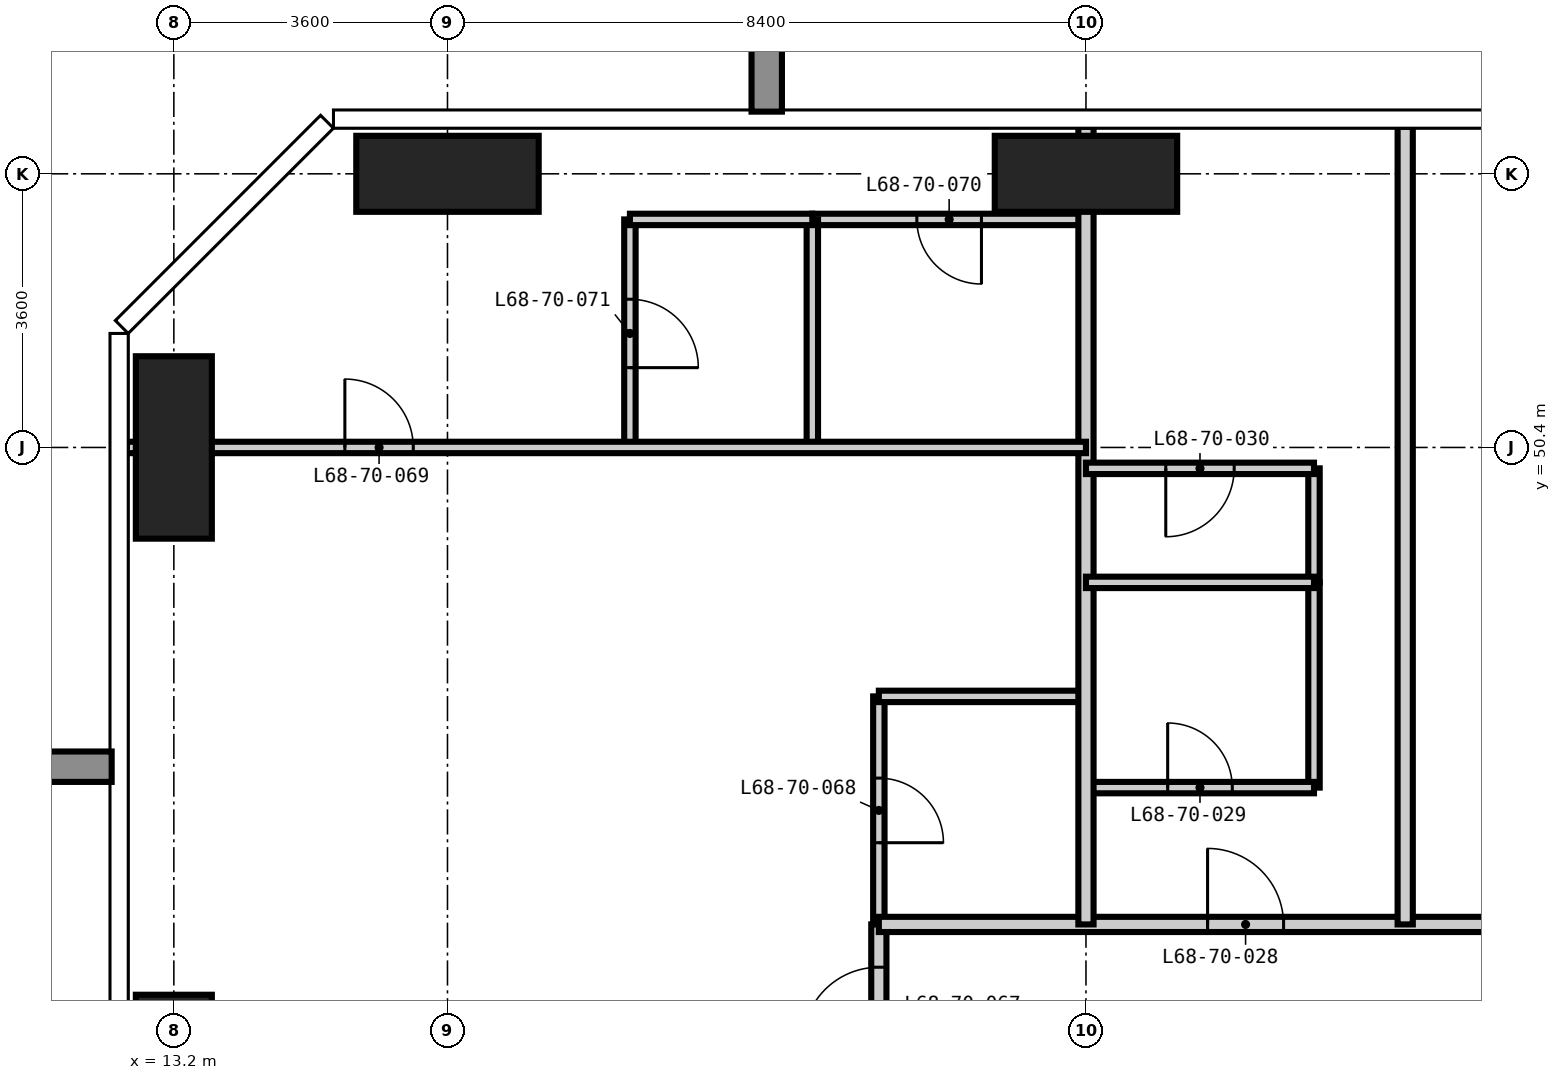
"""IFC4 building model, lengths in metres.
Left out: names, types, materials, properties, quantities, classifications, styles, units other than length and angle.
Written with IfcOpenShell. Run it as: python <this file> out.ifc"""

import sys

from ifc_helpers import new_model, si_unit, direction, frame, frame_2d, origin, origin_2d, place, context, subcontext, project, spatial, rectangle, extrude, element, fill, save


model = new_model("IFC4")
c1 = context("Model", 3, precision=1e-05, world=origin(), true_north=direction((0.0, 1.0)))
c2 = subcontext(c1, "Body", "Model", "MODEL_VIEW")
j1 = project(units=[si_unit("LENGTHUNIT", "METRE"), si_unit("PLANEANGLEUNIT", "RADIAN")], contexts=[c1])
p1 = place(None, origin())
s1 = spatial("IfcSite", under=j1, at=p1, CompositionType="ELEMENT")
p2 = place(p1, origin())
s2 = spatial("IfcBuilding", under=s1, at=p2, CompositionType="ELEMENT")
p3 = place(p2, frame((0.0, 0.0, 264.6)))
s3 = spatial("IfcBuildingStorey", under=s2, at=p3, CompositionType="ELEMENT", Elevation=264.6)
for number, where, z_axis, x_axis in (
    (1, (13.2, 42.0, -0.35), (0.0, 0.0, 1.0), (1.0, 0.0, 0.0)),
    (2, (13.2, 50.4, -0.35), (0.0, 0.0, 1.0), (1.0, 0.0, 0.0)),
):
    element("IfcColumn", number, at=place(p3, frame(where, z_axis=z_axis, x_axis=x_axis)), inside=s3, PredefinedType="COLUMN", context=c2, shape_type="SweptSolid", body=[
        extrude(rectangle(XDim=1.0, YDim=2.4, at=origin_2d()), origin(), (0.0, 0.0, 1.0), 3.9),
    ])
for number, where, z_axis, x_axis in (
    (3, (16.8, 54.0, -0.35), (0.0, 0.0, 1.0), (1.0, 0.0, 0.0)),
    (4, (25.2, 54.0, -0.35), (0.0, 0.0, 1.0), (1.0, 0.0, 0.0)),
):
    element("IfcColumn", number, at=place(p3, frame(where, z_axis=z_axis, x_axis=x_axis)), inside=s3, PredefinedType="COLUMN", context=c2, shape_type="SweptSolid", body=[
        extrude(rectangle(XDim=2.4, YDim=1.0, at=origin_2d()), origin(), (0.0, 0.0, 1.0), 3.9),
    ])
p4 = place(p3, frame((22.475, 44.125, 0.0), z_axis=(0.0, 0.0, 1.0), x_axis=(0.0, 1.0, 0.0)))
e5 = element("IfcWall", 5, at=p4, inside=s3, PredefinedType="PARTITIONING", context=c2, shape_type="SweptSolid", body=[
    extrude(rectangle(XDim=3.0, YDim=0.15, at=frame_2d((1.5, 0.0))), origin(), (0.0, 0.0, 1.0), 3.55),
])
p5 = place(p4, frame((1.075, 0.0, 0.0)))
e6 = element("IfcOpeningElement", 6, at=p5, cuts=e5, PredefinedType="OPENING", context=c2, shape_type="SweptSolid", body=[
    extrude(rectangle(XDim=0.85, YDim=2.1, at=frame_2d((0.425, 1.05))), frame((0.0, 0.085, 0.0), z_axis=(0.0, -1.0, 0.0), x_axis=(1.0, 0.0, 0.0)), (0.0, 0.0, 1.0), 0.17),
])
p6 = place(p3, frame((28.2, 45.925, 0.0), z_axis=(0.0, 0.0, 1.0), x_axis=(0.0, 1.0, 0.0)))
e7 = element("IfcWall", 7, at=p6, inside=s3, PredefinedType="PARTITIONING", context=c2, shape_type="SweptSolid", body=[
    extrude(rectangle(XDim=2.7, YDim=0.15, at=frame_2d((1.35, 0.0))), origin(), (0.0, 0.0, 1.0), 3.55),
])
p7 = place(p3, frame((25.2, 45.925, 0.0), z_axis=(0.0, 0.0, 1.0), x_axis=(1.0, 0.0, 0.0)))
e8 = element("IfcWall", 8, at=p7, inside=s3, PredefinedType="PARTITIONING", context=c2, shape_type="SweptSolid", body=[
    extrude(rectangle(XDim=3.0, YDim=0.15, at=frame_2d((1.5, 0.0))), origin(), (0.0, 0.0, 1.0), 3.55),
])
p8 = place(p7, frame((1.075, 0.0, 0.0)))
e9 = element("IfcOpeningElement", 9, at=p8, cuts=e8, PredefinedType="OPENING", context=c2, shape_type="SweptSolid", body=[
    extrude(rectangle(XDim=0.85, YDim=2.1, at=frame_2d((0.425, 1.05))), frame((0.0, 0.085, 0.0), z_axis=(0.0, -1.0, 0.0), x_axis=(1.0, 0.0, 0.0)), (0.0, 0.0, 1.0), 0.17),
])
p9 = place(p3, frame((22.475, 47.125, 0.0), z_axis=(0.0, 0.0, 1.0), x_axis=(1.0, 0.0, 0.0)))
e10 = element("IfcWall", 10, at=p9, inside=s3, PredefinedType="PARTITIONING", context=c2, shape_type="SweptSolid", body=[
    extrude(rectangle(XDim=2.725, YDim=0.15, at=frame_2d((1.362, 0.0))), origin(), (0.0, 0.0, 1.0), 3.55),
])
p10 = place(p3, frame((21.6, 53.4, 0.0), z_axis=(0.0, 0.0, 1.0), x_axis=(1.0, 0.0, 0.0)))
e11 = element("IfcWall", 11, at=p10, inside=s3, PredefinedType="PARTITIONING", context=c2, shape_type="SweptSolid", body=[
    extrude(rectangle(XDim=3.6, YDim=0.15, at=frame_2d((1.8, 0.0))), origin(), (0.0, 0.0, 1.0), 3.55),
])
p11 = place(p10, frame((1.375, 0.0, 0.0)))
e12 = element("IfcOpeningElement", 12, at=p11, cuts=e11, PredefinedType="OPENING", context=c2, shape_type="SweptSolid", body=[
    extrude(rectangle(XDim=0.85, YDim=2.1, at=frame_2d((0.425, 1.05))), frame((0.0, 0.085, 0.0), z_axis=(0.0, -1.0, 0.0), x_axis=(1.0, 0.0, 0.0)), (0.0, 0.0, 1.0), 0.17),
])
p12 = place(p3, frame((22.475, 14.075, 0.0), z_axis=(0.0, 0.0, 1.0), x_axis=(0.0, 1.0, 0.0)))
e13 = element("IfcWall", 13, at=p12, inside=s3, PredefinedType="PARTITIONING", context=c2, shape_type="SweptSolid", body=[
    extrude(rectangle(XDim=30.05, YDim=0.2, at=frame_2d((15.025, 0.0))), origin(), (0.0, 0.0, 1.0), 3.55),
])
p13 = place(p12, frame((4.325, 0.0, 0.0)))
e14 = element("IfcOpeningElement", 14, at=p13, cuts=e13, PredefinedType="OPENING", context=c2, shape_type="SweptSolid", body=[
    extrude(rectangle(XDim=1.0, YDim=2.2, at=frame_2d((0.5, 1.1))), frame((0.0, 0.11, 0.0), z_axis=(0.0, -1.0, 0.0), x_axis=(1.0, 0.0, 0.0)), (0.0, 0.0, 1.0), 0.22),
])
p14 = place(p12, frame((8.525, 0.0, 0.0)))
e15 = element("IfcOpeningElement", 15, at=p14, cuts=e13, PredefinedType="OPENING", context=c2, shape_type="SweptSolid", body=[
    extrude(rectangle(XDim=1.0, YDim=2.2, at=frame_2d((0.5, 1.1))), frame((0.0, 0.11, 0.0), z_axis=(0.0, -1.0, 0.0), x_axis=(1.0, 0.0, 0.0)), (0.0, 0.0, 1.0), 0.22),
])
p15 = place(p12, frame((13.625, 0.0, 0.0)))
e16 = element("IfcOpeningElement", 16, at=p15, cuts=e13, PredefinedType="OPENING", context=c2, shape_type="SweptSolid", body=[
    extrude(rectangle(XDim=1.0, YDim=2.2, at=frame_2d((0.5, 1.1))), frame((0.0, 0.11, 0.0), z_axis=(0.0, -1.0, 0.0), x_axis=(1.0, 0.0, 0.0)), (0.0, 0.0, 1.0), 0.22),
])
p16 = place(p12, frame((25.325, 0.0, 0.0)))
e17 = element("IfcOpeningElement", 17, at=p16, cuts=e13, PredefinedType="OPENING", context=c2, shape_type="SweptSolid", body=[
    extrude(rectangle(XDim=1.0, YDim=2.2, at=frame_2d((0.5, 1.1))), frame((0.0, 0.11, 0.0), z_axis=(0.0, -1.0, 0.0), x_axis=(1.0, 0.0, 0.0)), (0.0, 0.0, 1.0), 0.22),
])
p17 = place(p12, frame((0.863, 0.0, 0.0)))
e18 = element("IfcOpeningElement", 18, at=p17, cuts=e13, PredefinedType="OPENING", context=c2, shape_type="SweptSolid", body=[
    extrude(rectangle(XDim=1.0, YDim=2.2, at=frame_2d((0.5, 1.1))), frame((0.0, 0.11, 0.0), z_axis=(0.0, -1.0, 0.0), x_axis=(1.0, 0.0, 0.0)), (0.0, 0.0, 1.0), 0.22),
])
p18 = place(p12, frame((28.487, 0.0, 0.0)))
e19 = element("IfcOpeningElement", 19, at=p18, cuts=e13, PredefinedType="OPENING", context=c2, shape_type="SweptSolid", body=[
    extrude(rectangle(XDim=1.0, YDim=2.2, at=frame_2d((0.5, 1.1))), frame((0.0, 0.11, 0.0), z_axis=(0.0, -1.0, 0.0), x_axis=(1.0, 0.0, 0.0)), (0.0, 0.0, 1.0), 0.22),
])
p19 = place(p3, frame((22.475, 44.125, 0.0), z_axis=(0.0, 0.0, 1.0), x_axis=(1.0, 0.0, 0.0)))
e20 = element("IfcWall", 20, at=p19, inside=s3, PredefinedType="PARTITIONING", context=c2, shape_type="SweptSolid", body=[
    extrude(rectangle(XDim=22.85, YDim=0.2, at=frame_2d((11.425, 0.0))), origin(), (0.0, 0.0, 1.0), 3.55),
])
p20 = place(p19, frame((4.325, 0.0, 0.0)))
e21 = element("IfcOpeningElement", 21, at=p20, cuts=e20, PredefinedType="OPENING", context=c2, shape_type="SweptSolid", body=[
    extrude(rectangle(XDim=1.0, YDim=2.2, at=frame_2d((0.5, 1.1))), frame((0.0, 0.11, 0.0), z_axis=(0.0, -1.0, 0.0), x_axis=(1.0, 0.0, 0.0)), (0.0, 0.0, 1.0), 0.22),
])
p21 = place(p19, frame((10.625, 0.0, 0.0)))
e22 = element("IfcOpeningElement", 22, at=p21, cuts=e20, PredefinedType="OPENING", context=c2, shape_type="SweptSolid", body=[
    extrude(rectangle(XDim=1.0, YDim=2.2, at=frame_2d((0.5, 1.1))), frame((0.0, 0.11, 0.0), z_axis=(0.0, -1.0, 0.0), x_axis=(1.0, 0.0, 0.0)), (0.0, 0.0, 1.0), 0.22),
])
p22 = place(p19, frame((16.925, 0.0, 0.0)))
e23 = element("IfcOpeningElement", 23, at=p22, cuts=e20, PredefinedType="OPENING", context=c2, shape_type="SweptSolid", body=[
    extrude(rectangle(XDim=1.0, YDim=2.2, at=frame_2d((0.5, 1.1))), frame((0.0, 0.11, 0.0), z_axis=(0.0, -1.0, 0.0), x_axis=(1.0, 0.0, 0.0)), (0.0, 0.0, 1.0), 0.22),
])
for number, where, z_axis, x_axis in (
    (24, (25.2, 44.125, 0.0), (0.0, 0.0, 1.0), (0.0, 1.0, 0.0)),
    (25, (29.4, 44.125, 0.0), (0.0, 0.0, 1.0), (0.0, 1.0, 0.0)),
):
    element("IfcWall", number, at=place(p3, frame(where, z_axis=z_axis, x_axis=x_axis)), inside=s3, PredefinedType="PARTITIONING", context=c2, shape_type="SweptSolid", body=[
        extrude(rectangle(XDim=10.493, YDim=0.2, at=frame_2d((5.247, 0.0))), origin(), (0.0, 0.0, 1.0), 3.55),
    ])
p23 = place(p3, frame((19.2, 50.4, 0.0), z_axis=(0.0, 0.0, 1.0), x_axis=(0.0, 1.0, 0.0)))
e26 = element("IfcWall", 26, at=p23, inside=s3, PredefinedType="PARTITIONING", context=c2, shape_type="SweptSolid", body=[
    extrude(rectangle(XDim=3.0, YDim=0.15, at=frame_2d((1.5, 0.0))), origin(), (0.0, 0.0, 1.0), 3.55),
])
p24 = place(p23, frame((1.05, 0.0, 0.0)))
e27 = element("IfcOpeningElement", 27, at=p24, cuts=e26, PredefinedType="OPENING", context=c2, shape_type="SweptSolid", body=[
    extrude(rectangle(XDim=0.9, YDim=2.1, at=frame_2d((0.45, 1.05))), frame((0.0, 0.085, 0.0), z_axis=(0.0, -1.0, 0.0), x_axis=(1.0, 0.0, 0.0)), (0.0, 0.0, 1.0), 0.17),
])
p25 = place(p3, frame((21.6, 50.4, 0.0), z_axis=(0.0, 0.0, 1.0), x_axis=(0.0, 1.0, 0.0)))
e28 = element("IfcWall", 28, at=p25, inside=s3, PredefinedType="PARTITIONING", context=c2, shape_type="SweptSolid", body=[
    extrude(rectangle(XDim=3.0, YDim=0.15, at=frame_2d((1.5, 0.0))), origin(), (0.0, 0.0, 1.0), 3.55),
])
p26 = place(p3, frame((28.2, 48.625, 0.0), z_axis=(0.0, 0.0, 1.0), x_axis=(0.0, 1.0, 0.0)))
e29 = element("IfcWall", 29, at=p26, inside=s3, PredefinedType="PARTITIONING", context=c2, shape_type="SweptSolid", body=[
    extrude(rectangle(XDim=1.5, YDim=0.15, at=frame_2d((0.75, 0.0))), origin(), (0.0, 0.0, 1.0), 3.55),
])
p27 = place(p3, frame((25.2, 48.625, 0.0), z_axis=(0.0, 0.0, 1.0), x_axis=(1.0, 0.0, 0.0)))
e30 = element("IfcWall", 30, at=p27, inside=s3, PredefinedType="PARTITIONING", context=c2, shape_type="SweptSolid", body=[
    extrude(rectangle(XDim=3.0, YDim=0.15, at=frame_2d((1.5, 0.0))), origin(), (0.0, 0.0, 1.0), 3.55),
])
p28 = place(p3, frame((25.2, 50.125, 0.0), z_axis=(0.0, 0.0, 1.0), x_axis=(1.0, 0.0, 0.0)))
e31 = element("IfcWall", 31, at=p28, inside=s3, PredefinedType="PARTITIONING", context=c2, shape_type="SweptSolid", body=[
    extrude(rectangle(XDim=3.0, YDim=0.15, at=frame_2d((1.5, 0.0))), origin(), (0.0, 0.0, 1.0), 3.55),
])
p29 = place(p28, frame((1.05, 0.0, 0.0)))
e32 = element("IfcOpeningElement", 32, at=p29, cuts=e31, PredefinedType="OPENING", context=c2, shape_type="SweptSolid", body=[
    extrude(rectangle(XDim=0.9, YDim=2.1, at=frame_2d((0.45, 1.05))), frame((0.0, 0.085, 0.0), z_axis=(0.0, -1.0, 0.0), x_axis=(1.0, 0.0, 0.0)), (0.0, 0.0, 1.0), 0.17),
])
p30 = place(p3, frame((12.582, 50.4, 0.0), z_axis=(0.0, 0.0, 1.0), x_axis=(1.0, 0.0, 0.0)))
e33 = element("IfcWall", 33, at=p30, inside=s3, PredefinedType="PARTITIONING", context=c2, shape_type="SweptSolid", body=[
    extrude(rectangle(XDim=12.618, YDim=0.15, at=frame_2d((6.309, 0.0))), origin(), (0.0, 0.0, 1.0), 3.55),
])
p31 = place(p30, frame((2.868, 0.0, 0.0)))
e34 = element("IfcOpeningElement", 34, at=p31, cuts=e33, PredefinedType="OPENING", context=c2, shape_type="SweptSolid", body=[
    extrude(rectangle(XDim=0.9, YDim=2.1, at=frame_2d((0.45, 1.05))), frame((0.0, 0.085, 0.0), z_axis=(0.0, -1.0, 0.0), x_axis=(1.0, 0.0, 0.0)), (0.0, 0.0, 1.0), 0.17),
])
p32 = place(p3, frame((19.2, 53.4, 0.0), z_axis=(0.0, 0.0, 1.0), x_axis=(1.0, 0.0, 0.0)))
e35 = element("IfcWall", 35, at=p32, inside=s3, PredefinedType="PARTITIONING", context=c2, shape_type="SweptSolid", body=[
    extrude(rectangle(XDim=2.4, YDim=0.15, at=frame_2d((1.2, 0.0))), origin(), (0.0, 0.0, 1.0), 3.55),
])
p33 = place(p20, origin())
e36 = element("IfcDoor", 36, at=p33, inside=s3, OperationType="SINGLE_SWING_LEFT", PredefinedType="DOOR", context=c2, shape_type="SweptSolid", body=[
    extrude(rectangle(XDim=1.0, YDim=2.2, at=frame_2d((0.5, 1.1))), frame((0.0, 0.025, 0.0), z_axis=(0.0, -1.0, 0.0), x_axis=(1.0, 0.0, 0.0)), (0.0, 0.0, 1.0), 0.05),
])
fill(e21, e36)
p34 = place(p8, origin())
e37 = element("IfcDoor", 37, at=p34, inside=s3, OperationType="SINGLE_SWING_LEFT", PredefinedType="DOOR", context=c2, shape_type="SweptSolid", body=[
    extrude(rectangle(XDim=0.85, YDim=2.1, at=frame_2d((0.425, 1.05))), frame((0.0, 0.025, 0.0), z_axis=(0.0, -1.0, 0.0), x_axis=(1.0, 0.0, 0.0)), (0.0, 0.0, 1.0), 0.05),
])
fill(e9, e37)
p35 = place(p29, frame((0.9, 0.0, 0.0), z_axis=(0.0, 0.0, 1.0), x_axis=(-1.0, 0.0, 0.0)))
e38 = element("IfcDoor", 38, at=p35, inside=s3, OperationType="SINGLE_SWING_RIGHT", PredefinedType="DOOR", context=c2, shape_type="SweptSolid", body=[
    extrude(rectangle(XDim=0.9, YDim=2.1, at=frame_2d((0.45, 1.05))), frame((0.0, 0.025, 0.0), z_axis=(0.0, -1.0, 0.0), x_axis=(1.0, 0.0, 0.0)), (0.0, 0.0, 1.0), 0.05),
])
fill(e32, e38)
p36 = place(p18, origin())
e39 = element("IfcDoor", 39, at=p36, inside=s3, OperationType="SINGLE_SWING_LEFT", PredefinedType="DOOR", context=c2, shape_type="SweptSolid", body=[
    extrude(rectangle(XDim=1.0, YDim=2.2, at=frame_2d((0.5, 1.1))), frame((0.0, 0.025, 0.0), z_axis=(0.0, -1.0, 0.0), x_axis=(1.0, 0.0, 0.0)), (0.0, 0.0, 1.0), 0.05),
])
fill(e19, e39)
p37 = place(p5, frame((0.85, 0.0, 0.0), z_axis=(0.0, 0.0, 1.0), x_axis=(-1.0, 0.0, 0.0)))
e40 = element("IfcDoor", 40, at=p37, inside=s3, OperationType="SINGLE_SWING_RIGHT", PredefinedType="DOOR", context=c2, shape_type="SweptSolid", body=[
    extrude(rectangle(XDim=0.85, YDim=2.1, at=frame_2d((0.425, 1.05))), frame((0.0, 0.025, 0.0), z_axis=(0.0, -1.0, 0.0), x_axis=(1.0, 0.0, 0.0)), (0.0, 0.0, 1.0), 0.05),
])
fill(e6, e40)
p38 = place(p31, origin())
e41 = element("IfcDoor", 41, at=p38, inside=s3, OperationType="SINGLE_SWING_LEFT", PredefinedType="DOOR", context=c2, shape_type="SweptSolid", body=[
    extrude(rectangle(XDim=0.9, YDim=2.1, at=frame_2d((0.45, 1.05))), frame((0.0, 0.025, 0.0), z_axis=(0.0, -1.0, 0.0), x_axis=(1.0, 0.0, 0.0)), (0.0, 0.0, 1.0), 0.05),
])
fill(e34, e41)
p39 = place(p11, frame((0.85, 0.0, 0.0), z_axis=(0.0, 0.0, 1.0), x_axis=(-1.0, 0.0, 0.0)))
e42 = element("IfcDoor", 42, at=p39, inside=s3, OperationType="SINGLE_SWING_LEFT", PredefinedType="DOOR", context=c2, shape_type="SweptSolid", body=[
    extrude(rectangle(XDim=0.85, YDim=2.1, at=frame_2d((0.425, 1.05))), frame((0.0, 0.025, 0.0), z_axis=(0.0, -1.0, 0.0), x_axis=(1.0, 0.0, 0.0)), (0.0, 0.0, 1.0), 0.05),
])
fill(e12, e42)
p40 = place(p24, frame((0.9, 0.0, 0.0), z_axis=(0.0, 0.0, 1.0), x_axis=(-1.0, 0.0, 0.0)))
e43 = element("IfcDoor", 43, at=p40, inside=s3, OperationType="SINGLE_SWING_RIGHT", PredefinedType="DOOR", context=c2, shape_type="SweptSolid", body=[
    extrude(rectangle(XDim=0.9, YDim=2.1, at=frame_2d((0.45, 1.05))), frame((0.0, 0.025, 0.0), z_axis=(0.0, -1.0, 0.0), x_axis=(1.0, 0.0, 0.0)), (0.0, 0.0, 1.0), 0.05),
])
fill(e27, e43)
save(model, sys.argv[1])
